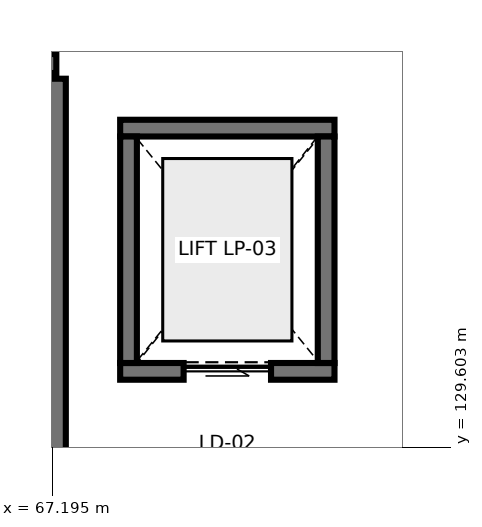
"""IFC4 building model, lengths in metres.
Left out: names, types, materials, properties, quantities, classifications, styles, units other than length and angle.
Written with IfcOpenShell. Run it as: python <this file> out.ifc"""

import sys

from ifc_helpers import new_model, si_unit, direction, frame, frame_2d, origin, place, context, subcontext, project, spatial, rectangle, extrude, element, fill, save


model = new_model("IFC4")
c1 = context("Model", 3, precision=1e-05, world=origin(), true_north=direction((0.0, 1.0)))
c2 = subcontext(c1, "Body", "Model", "MODEL_VIEW")
j1 = project(units=[si_unit("LENGTHUNIT", "METRE"), si_unit("PLANEANGLEUNIT", "RADIAN")], contexts=[c1])
p1 = place(None, origin())
s1 = spatial("IfcSite", under=j1, at=p1, CompositionType="ELEMENT")
p2 = place(p1, origin())
s2 = spatial("IfcBuilding", under=s1, at=p2, CompositionType="ELEMENT")
p3 = place(p2, frame((0.0, 0.0, 19.5)))
s3 = spatial("IfcBuildingStorey", under=s2, at=p3, CompositionType="ELEMENT", Elevation=19.5)
p4 = place(p3, frame((58.95, 134.65, 0.0), z_axis=(0.0, 0.0, 1.0), x_axis=(1.0, 0.0, 0.0)))
e1 = element("IfcWall", 1, at=p4, inside=s3, PredefinedType="SHEAR", context=c2, shape_type="SweptSolid", body=[
    extrude(rectangle(XDim=8.3, YDim=0.25, at=frame_2d((4.15, 0.0))), origin(), (0.0, 0.0, 1.0), 3.94),
])
p5 = place(p3, frame((67.25, 134.45, 0.0), z_axis=(0.0, 0.0, 1.0), x_axis=(0.0, -1.0, 0.0)))
e2 = element("IfcWall", 2, at=p5, inside=s3, PredefinedType="SHEAR", context=c2, shape_type="SweptSolid", body=[
    extrude(rectangle(XDim=5.3, YDim=0.25, at=frame_2d((2.65, 0.0))), origin(), (0.0, 0.0, 1.0), 3.94),
])
p6 = place(p3, frame((68.09, 130.6, 0.0), z_axis=(0.0, 0.0, 1.0), x_axis=(1.0, 0.0, 0.0)))
e3 = element("IfcWall", 3, at=p6, inside=s3, PredefinedType="SHEAR", context=c2, shape_type="SweptSolid", body=[
    extrude(rectangle(XDim=2.82, YDim=0.22, at=frame_2d((1.41, 0.0))), origin(), (0.0, 0.0, 1.0), 3.94),
])
p7 = place(p6, frame((0.835, 0.0, 0.0)))
e4 = element("IfcOpeningElement", 4, at=p7, cuts=e3, PredefinedType="OPENING", context=c2, shape_type="SweptSolid", body=[
    extrude(rectangle(XDim=1.15, YDim=2.2, at=frame_2d((0.575, 1.1))), frame((0.0, 0.12, 0.0), z_axis=(0.0, -1.0, 0.0), x_axis=(1.0, 0.0, 0.0)), (0.0, 0.0, 1.0), 0.24),
])
p8 = place(p3, frame((68.09, 133.8, 0.0), z_axis=(0.0, 0.0, 1.0), x_axis=(1.0, 0.0, 0.0)))
e5 = element("IfcWall", 5, at=p8, inside=s3, PredefinedType="SHEAR", context=c2, shape_type="SweptSolid", body=[
    extrude(rectangle(XDim=2.82, YDim=0.22, at=frame_2d((1.41, 0.0))), origin(), (0.0, 0.0, 1.0), 3.94),
])
for number, where, z_axis, x_axis in (
    (6, (68.2, 130.71, 0.0), (0.0, 0.0, 1.0), (0.0, 1.0, 0.0)),
    (7, (70.8, 130.71, 0.0), (0.0, 0.0, 1.0), (0.0, 1.0, 0.0)),
):
    element("IfcWall", number, at=place(p3, frame(where, z_axis=z_axis, x_axis=x_axis)), inside=s3, PredefinedType="SHEAR", context=c2, shape_type="SweptSolid", body=[
        extrude(rectangle(XDim=2.98, YDim=0.22, at=frame_2d((1.49, 0.0))), origin(), (0.0, 0.0, 1.0), 3.94),
    ])
p9 = place(p7, origin())
e8 = element("IfcDoor", 8, at=p9, inside=s3, OperationType="SLIDING_TO_LEFT", PredefinedType="DOOR", context=c2, shape_type="SweptSolid", body=[
    extrude(rectangle(XDim=1.15, YDim=2.2, at=frame_2d((0.575, 1.1))), frame((0.0, 0.025, 0.0), z_axis=(0.0, -1.0, 0.0), x_axis=(1.0, 0.0, 0.0)), (0.0, 0.0, 1.0), 0.05),
])
fill(e4, e8)
save(model, sys.argv[1])
